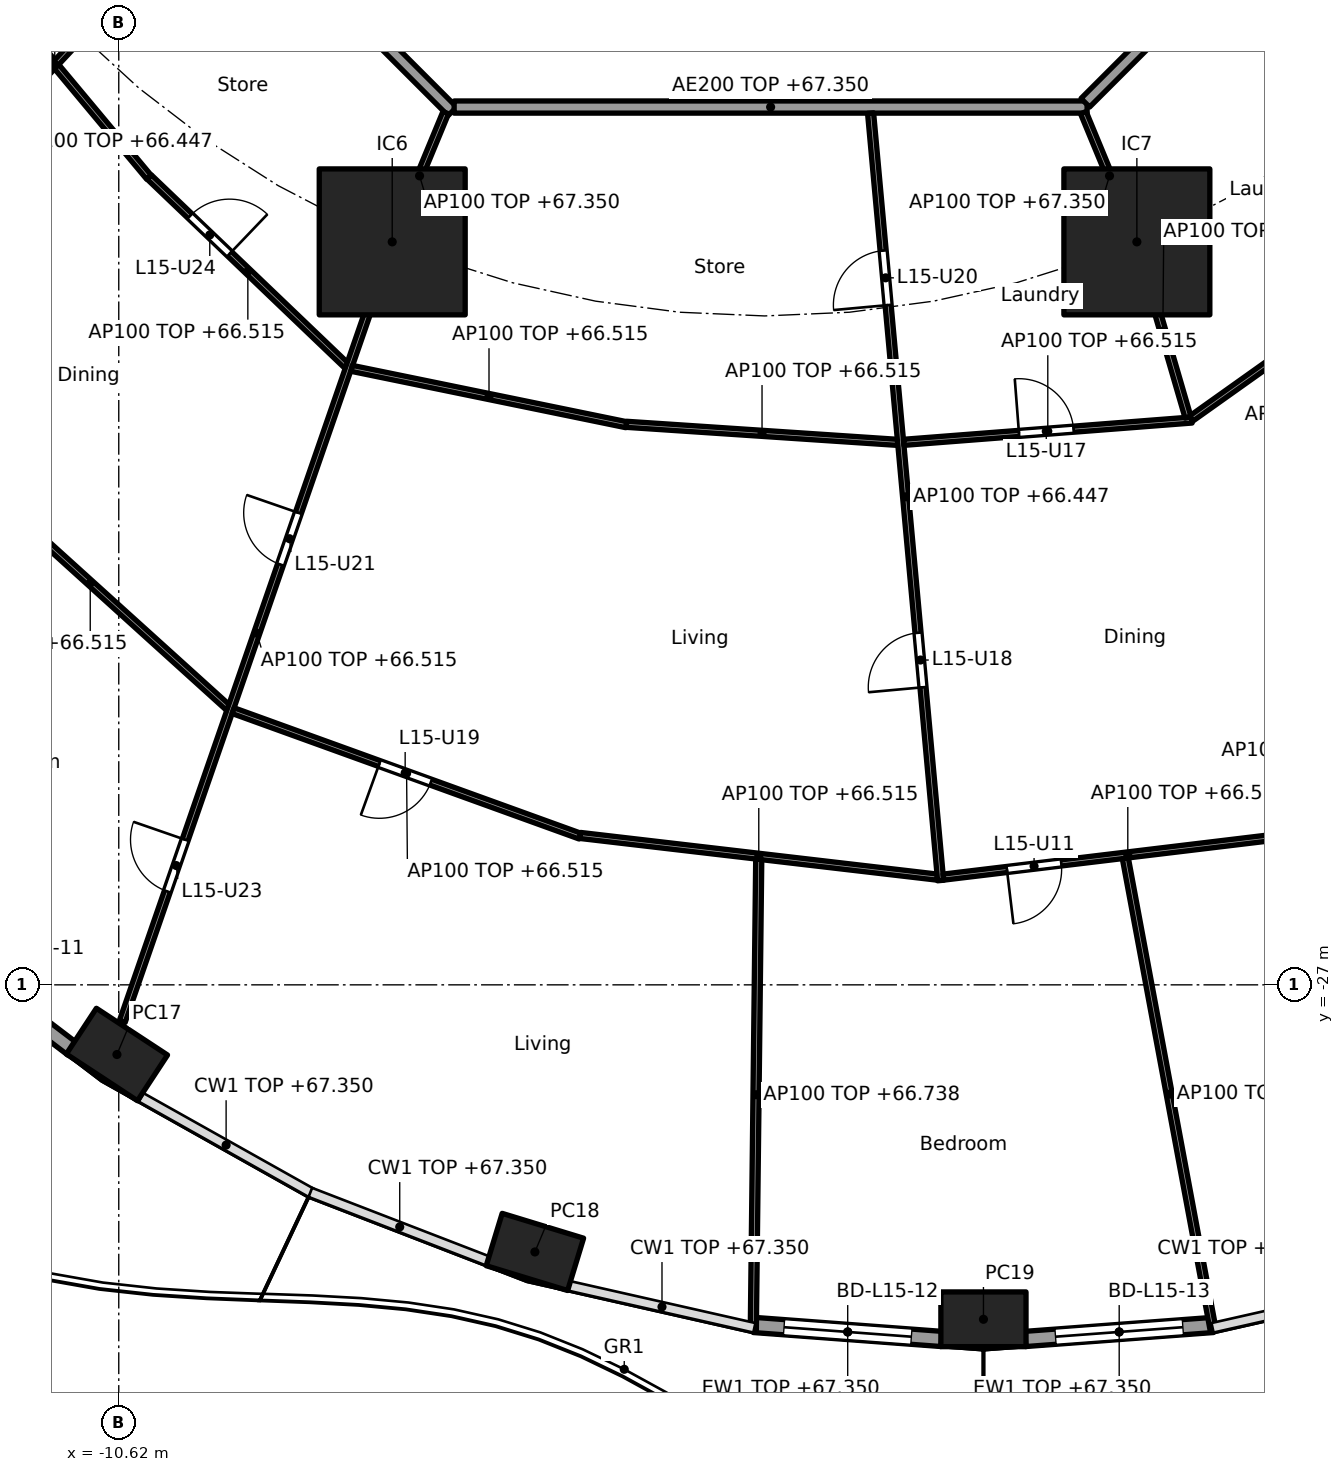
"""IFC4 building model, lengths in metres.
Left out: names, types, materials, properties, quantities, classifications, styles, units other than length and angle.
Written with IfcOpenShell. Run it as: python <this file> out.ifc"""

import sys

from ifc_helpers import new_model, si_unit, direction, frame, frame_2d, origin, origin_2d, place, context, subcontext, project, spatial, rectangle, hollow_rectangle, extrude, element, fill, save


model = new_model("IFC4")
c1 = context("Model", 3, precision=1e-05, world=origin(), true_north=direction((0.0, 1.0)))
c2 = subcontext(c1, "Body", "Model", "MODEL_VIEW")
j1 = project(units=[si_unit("LENGTHUNIT", "METRE"), si_unit("PLANEANGLEUNIT", "RADIAN")], contexts=[c1])
p1 = place(None, origin())
s1 = spatial("IfcSite", under=j1, at=p1, CompositionType="ELEMENT")
p2 = place(p1, origin())
s2 = spatial("IfcBuilding", under=s1, at=p2, CompositionType="ELEMENT")
p3 = place(p2, frame((0.0, 0.0, 64.0)))
s3 = spatial("IfcBuildingStorey", under=s2, at=p3, CompositionType="ELEMENT", Elevation=64.0)
for number, where, z_axis, x_axis in (
    (1, (-10.65, -28.146, 0.0), (0.0, 0.0, 1.0), (0.836, -0.549, 0.0)),
    (2, (-3.776, -31.393, 0.0), (0.0, 0.0, 1.0), (0.957, -0.292, 0.0)),
    (3, (3.6, -32.5, 0.0), (0.0, 0.0, 1.0), (1.0, 0.0, 0.0)),
):
    element("IfcColumn", number, at=place(p3, frame(where, z_axis=z_axis, x_axis=x_axis)), inside=s3, PredefinedType="COLUMN", context=c2, shape_type="SweptSolid", body=[
        extrude(hollow_rectangle(XDim=1.4, YDim=0.9, WallThickness=0.05, at=origin_2d()), origin(), (0.0, 0.0, 1.0), 3.7),
    ])
for number, where, z_axis, x_axis in (
    (4, (-6.123, -14.782, 0.0), (0.0, 0.0, 1.0), (1.0, 0.0, 0.0)),
    (5, (6.123, -14.782, 0.0), (0.0, 0.0, 1.0), (1.0, 0.0, 0.0)),
):
    element("IfcColumn", number, at=place(p3, frame(where, z_axis=z_axis, x_axis=x_axis)), inside=s3, PredefinedType="COLUMN", context=c2, shape_type="SweptSolid", body=[
        extrude(rectangle(XDim=2.4, YDim=2.4, at=origin_2d()), origin(), (0.0, 0.0, 1.0), 3.7),
    ])
p4 = place(p3, frame((-11.382, -28.056, 0.0), z_axis=(0.0, 0.0, 1.0), x_axis=(-0.796022293214, 0.605267303517, 0.0)))
e6 = element("IfcWall", 6, at=p4, inside=s3, PredefinedType="SOLIDWALL", context=c2, shape_type="SweptSolid", body=[
    extrude(rectangle(XDim=3.262, YDim=0.25, at=frame_2d((1.631, 0.0))), origin(), (0.0, 0.0, 1.0), 3.35),
])
p5 = place(p4, frame((0.581, 0.0, 0.0)))
e7 = element("IfcOpeningElement", 7, at=p5, cuts=e6, PredefinedType="OPENING", context=c2, shape_type="SweptSolid", body=[
    extrude(rectangle(XDim=2.1, YDim=2.4, at=frame_2d((1.05, 1.2))), frame((0.0, 0.135, 0.0), z_axis=(0.0, -1.0, 0.0), x_axis=(1.0, 0.0, 0.0)), (0.0, 0.0, 1.0), 0.27),
])
p6 = place(p3, frame((2.911, -32.823, 0.0), z_axis=(0.0, 0.0, 1.0), x_axis=(-0.997230834878, 0.074368420505, 0.0)))
e8 = element("IfcWall", 8, at=p6, inside=s3, PredefinedType="SOLIDWALL", context=c2, shape_type="SweptSolid", body=[
    extrude(rectangle(XDim=3.096, YDim=0.25, at=frame_2d((1.548, 0.0))), origin(), (0.0, 0.0, 1.0), 3.35),
])
p7 = place(p6, frame((0.498, 0.0, 0.0)))
e9 = element("IfcOpeningElement", 9, at=p7, cuts=e8, PredefinedType="OPENING", context=c2, shape_type="SweptSolid", body=[
    extrude(rectangle(XDim=2.1, YDim=2.4, at=frame_2d((1.05, 1.2))), frame((0.0, 0.135, 0.0), z_axis=(0.0, -1.0, 0.0), x_axis=(1.0, 0.0, 0.0)), (0.0, 0.0, 1.0), 0.27),
])
p8 = place(p3, frame((7.376, -32.593, 0.0), z_axis=(0.0, 0.0, 1.0), x_axis=(-0.997230834878, -0.074368420505, 0.0)))
e10 = element("IfcWall", 10, at=p8, inside=s3, PredefinedType="SOLIDWALL", context=c2, shape_type="SweptSolid", body=[
    extrude(rectangle(XDim=3.096, YDim=0.25, at=frame_2d((1.548, 0.0))), origin(), (0.0, 0.0, 1.0), 3.35),
])
p9 = place(p8, frame((0.498, 0.0, 0.0)))
e11 = element("IfcOpeningElement", 11, at=p9, cuts=e10, PredefinedType="OPENING", context=c2, shape_type="SweptSolid", body=[
    extrude(rectangle(XDim=2.1, YDim=2.4, at=frame_2d((1.05, 1.2))), frame((0.0, 0.135, 0.0), z_axis=(0.0, -1.0, 0.0), x_axis=(1.0, 0.0, 0.0)), (0.0, 0.0, 1.0), 0.27),
])
p10 = place(p3, frame((-12.635, -5.134, 0.0), z_axis=(0.0, 0.0, 1.0), x_axis=(0.707106781187, -0.707106781187, 0.0)))
e12 = element("IfcWall", 12, at=p10, inside=s3, PredefinedType="PARTITIONING", context=c2, shape_type="SweptSolid", body=[
    extrude(rectangle(XDim=10.609, YDim=0.2, at=frame_2d((5.305, 0.0))), origin(), (0.0, 0.0, 1.0), 3.35),
])
p11 = place(p3, frame((-5.104, -12.565, 0.0), z_axis=(0.0, 0.0, 1.0), x_axis=(1.0, 0.0, 0.0)))
e13 = element("IfcWall", 13, at=p11, inside=s3, PredefinedType="PARTITIONING", context=c2, shape_type="SweptSolid", body=[
    extrude(rectangle(XDim=10.409, YDim=0.2, at=frame_2d((5.205, 0.0))), origin(), (0.0, 0.0, 1.0), 3.35),
])
p12 = place(p3, frame((5.275, -12.494, 0.0), z_axis=(0.0, 0.0, 1.0), x_axis=(0.707106781187, 0.707106781187, 0.0)))
e14 = element("IfcWall", 14, at=p12, inside=s3, PredefinedType="PARTITIONING", context=c2, shape_type="SweptSolid", body=[
    extrude(rectangle(XDim=10.409, YDim=0.2, at=frame_2d((5.205, 0.0))), origin(), (0.0, 0.0, 1.0), 3.35),
])
p13 = place(p12, frame((4.604, 0.0, 0.0)))
e15 = element("IfcOpeningElement", 15, at=p13, cuts=e14, PredefinedType="OPENING", context=c2, shape_type="SweptSolid", body=[
    extrude(rectangle(XDim=1.0, YDim=2.1, at=frame_2d((0.5, 1.05))), frame((0.0, 0.11, 0.0), z_axis=(0.0, -1.0, 0.0), x_axis=(1.0, 0.0, 0.0)), (0.0, 0.0, 1.0), 0.22),
])
p14 = place(p3, frame((-13.222, -10.007, 0.0), z_axis=(0.0, 0.0, 1.0), x_axis=(0.64083455704, -0.767679015282, 0.0)))
e16 = element("IfcWall", 16, at=p14, inside=s3, PredefinedType="PARTITIONING", context=c2, shape_type="SweptSolid", body=[
    extrude(rectangle(XDim=4.837, YDim=0.1, at=frame_2d((2.418, 0.0))), origin(), (0.0, 0.0, 1.0), 2.515),
])
p15 = place(p3, frame((-8.953, -8.958, 0.0), z_axis=(0.0, 0.0, 1.0), x_axis=(-0.683322485948, -0.730116689439, 0.0)))
e17 = element("IfcWall", 17, at=p15, inside=s3, PredefinedType="PARTITIONING", context=c2, shape_type="SweptSolid", body=[
    extrude(rectangle(XDim=9.219, YDim=0.1, at=frame_2d((4.609, 0.0))), origin(), (0.0, 0.0, 1.0), 2.447),
])
p16 = place(p15, frame((6.149, 0.0, 0.0)))
e18 = element("IfcOpeningElement", 18, at=p16, cuts=e17, PredefinedType="OPENING", context=c2, shape_type="SweptSolid", body=[
    extrude(rectangle(XDim=0.9, YDim=2.1, at=frame_2d((0.45, 1.05))), frame((0.0, 0.06, 0.0), z_axis=(0.0, -1.0, 0.0), x_axis=(1.0, 0.0, 0.0)), (0.0, 0.0, 1.0), 0.12),
])
p17 = place(p3, frame((-10.119, -13.716, 0.0), z_axis=(0.0, 0.0, 1.0), x_axis=(0.722762371977, -0.691096631199, 0.0)))
e19 = element("IfcWall", 19, at=p17, inside=s3, PredefinedType="PARTITIONING", context=c2, shape_type="SweptSolid", body=[
    extrude(rectangle(XDim=4.487, YDim=0.1, at=frame_2d((2.244, 0.0))), origin(), (0.0, 0.0, 1.0), 2.515),
])
p18 = place(p17, frame((0.927, 0.0, 0.0)))
e20 = element("IfcOpeningElement", 20, at=p18, cuts=e19, PredefinedType="OPENING", context=c2, shape_type="SweptSolid", body=[
    extrude(rectangle(XDim=0.9, YDim=2.1, at=frame_2d((0.45, 1.05))), frame((0.0, 0.06, 0.0), z_axis=(0.0, -1.0, 0.0), x_axis=(1.0, 0.0, 0.0)), (0.0, 0.0, 1.0), 0.12),
])
p19 = place(p3, frame((-13.355, -18.343, 0.0), z_axis=(0.0, 0.0, 1.0), x_axis=(0.741722263338, -0.670707152242, 0.0)))
e21 = element("IfcWall", 21, at=p19, inside=s3, PredefinedType="PARTITIONING", context=c2, shape_type="SweptSolid", body=[
    extrude(rectangle(XDim=6.109, YDim=0.1, at=frame_2d((3.055, 0.0))), origin(), (0.0, 0.0, 1.0), 2.515),
])
p20 = place(p3, frame((-5.243, -12.657, 0.0), z_axis=(0.0, 0.0, 1.0), x_axis=(-0.382719158442, -0.923864733477, 0.0)))
e22 = element("IfcWall", 22, at=p20, inside=s3, PredefinedType="PARTITIONING", context=c2, shape_type="SweptSolid", body=[
    extrude(rectangle(XDim=2.25, YDim=0.1, at=frame_2d((1.125, 0.0))), origin(), (0.0, 0.0, 1.0), 3.35),
])
p21 = place(p3, frame((-6.139, -14.829, 0.0), z_axis=(0.0, 0.0, 1.0), x_axis=(-0.327178799566, -0.944962450637, 0.0)))
e23 = element("IfcWall", 23, at=p21, inside=s3, PredefinedType="PARTITIONING", context=c2, shape_type="SweptSolid", body=[
    extrude(rectangle(XDim=13.517, YDim=0.1, at=frame_2d((6.759, 0.0))), origin(), (0.0, 0.0, 1.0), 2.515),
])
p22 = place(p21, frame((4.665, 0.0, 0.0)))
e24 = element("IfcOpeningElement", 24, at=p22, cuts=e23, PredefinedType="OPENING", context=c2, shape_type="SweptSolid", body=[
    extrude(rectangle(XDim=0.9, YDim=2.1, at=frame_2d((0.45, 1.05))), frame((0.0, 0.06, 0.0), z_axis=(0.0, -1.0, 0.0), x_axis=(1.0, 0.0, 0.0)), (0.0, 0.0, 1.0), 0.12),
])
p23 = place(p21, frame((10.354, 0.0, 0.0)))
e25 = element("IfcOpeningElement", 25, at=p23, cuts=e23, PredefinedType="OPENING", context=c2, shape_type="SweptSolid", body=[
    extrude(rectangle(XDim=0.9, YDim=2.1, at=frame_2d((0.45, 1.05))), frame((0.0, 0.06, 0.0), z_axis=(0.0, -1.0, 0.0), x_axis=(1.0, 0.0, 0.0)), (0.0, 0.0, 1.0), 0.12),
])
p24 = place(p3, frame((-6.791, -16.862, 0.0), z_axis=(0.0, 0.0, 1.0), x_axis=(0.979587203416, -0.2010196779, 0.0)))
e26 = element("IfcWall", 26, at=p24, inside=s3, PredefinedType="PARTITIONING", context=c2, shape_type="SweptSolid", body=[
    extrude(rectangle(XDim=4.613, YDim=0.1, at=frame_2d((2.306, 0.0))), origin(), (0.0, 0.0, 1.0), 2.515),
])
p25 = place(p3, frame((-8.739, -22.491, 0.0), z_axis=(0.0, 0.0, 1.0), x_axis=(0.940401691072, -0.340065669288, 0.0)))
e27 = element("IfcWall", 27, at=p25, inside=s3, PredefinedType="PARTITIONING", context=c2, shape_type="SweptSolid", body=[
    extrude(rectangle(XDim=6.067, YDim=0.1, at=frame_2d((3.034, 0.0))), origin(), (0.0, 0.0, 1.0), 2.515),
])
p26 = place(p25, frame((2.559, 0.0, 0.0)))
e28 = element("IfcOpeningElement", 28, at=p26, cuts=e27, PredefinedType="OPENING", context=c2, shape_type="SweptSolid", body=[
    extrude(rectangle(XDim=0.9, YDim=2.1, at=frame_2d((0.45, 1.05))), frame((0.0, 0.06, 0.0), z_axis=(0.0, -1.0, 0.0), x_axis=(1.0, 0.0, 0.0)), (0.0, 0.0, 1.0), 0.12),
])
p27 = place(p3, frame((-2.271, -17.782, 0.0), z_axis=(0.0, 0.0, 1.0), x_axis=(0.997791437766, -0.066424744789, 0.0)))
e29 = element("IfcWall", 29, at=p27, inside=s3, PredefinedType="PARTITIONING", context=c2, shape_type="SweptSolid", body=[
    extrude(rectangle(XDim=4.469, YDim=0.1, at=frame_2d((2.235, 0.0))), origin(), (0.0, 0.0, 1.0), 2.515),
])
p28 = place(p3, frame((-3.031, -24.543, 0.0), z_axis=(0.0, 0.0, 1.0), x_axis=(0.993255612046, -0.115945198862, 0.0)))
e30 = element("IfcWall", 30, at=p28, inside=s3, PredefinedType="PARTITIONING", context=c2, shape_type="SweptSolid", body=[
    extrude(rectangle(XDim=5.913, YDim=0.1, at=frame_2d((2.956, 0.0))), origin(), (0.0, 0.0, 1.0), 2.515),
])
p29 = place(p3, frame((-0.095, -24.936, 0.0), z_axis=(0.0, 0.0, 1.0), x_axis=(-0.011541331541, -0.999933396615, 0.0)))
e31 = element("IfcWall", 31, at=p29, inside=s3, PredefinedType="PARTITIONING", context=c2, shape_type="SweptSolid", body=[
    extrude(rectangle(XDim=7.742, YDim=0.1, at=frame_2d((3.871, 0.0))), origin(), (0.0, 0.0, 1.0), 2.738),
])
p30 = place(p3, frame((1.744, -12.664, 0.0), z_axis=(0.0, 0.0, 1.0), x_axis=(0.090893569001, -0.995860612292, 0.0)))
e32 = element("IfcWall", 32, at=p30, inside=s3, PredefinedType="PARTITIONING", context=c2, shape_type="SweptSolid", body=[
    extrude(rectangle(XDim=12.673, YDim=0.1, at=frame_2d((6.336, 0.0))), origin(), (0.0, 0.0, 1.0), 2.447),
])
p31 = place(p30, frame((8.582, 0.0, 0.0)))
e33 = element("IfcOpeningElement", 33, at=p31, cuts=e32, PredefinedType="OPENING", context=c2, shape_type="SweptSolid", body=[
    extrude(rectangle(XDim=0.9, YDim=2.1, at=frame_2d((0.45, 1.05))), frame((0.0, 0.06, 0.0), z_axis=(0.0, -1.0, 0.0), x_axis=(1.0, 0.0, 0.0)), (0.0, 0.0, 1.0), 0.12),
])
p32 = place(p30, frame((2.27, 0.0, 0.0)))
e34 = element("IfcOpeningElement", 34, at=p32, cuts=e32, PredefinedType="OPENING", context=c2, shape_type="SweptSolid", body=[
    extrude(rectangle(XDim=0.9, YDim=2.1, at=frame_2d((0.45, 1.05))), frame((0.0, 0.06, 0.0), z_axis=(0.0, -1.0, 0.0), x_axis=(1.0, 0.0, 0.0)), (0.0, 0.0, 1.0), 0.12),
])
p33 = place(p3, frame((2.288, -18.078, 0.0), z_axis=(0.0, 0.0, 1.0), x_axis=(0.997016297228, 0.077191340583, 0.0)))
e35 = element("IfcWall", 35, at=p33, inside=s3, PredefinedType="PARTITIONING", context=c2, shape_type="SweptSolid", body=[
    extrude(rectangle(XDim=4.754, YDim=0.1, at=frame_2d((2.377, 0.0))), origin(), (0.0, 0.0, 1.0), 2.515),
])
p34 = place(p33, frame((1.902, 0.0, 0.0)))
e36 = element("IfcOpeningElement", 36, at=p34, cuts=e35, PredefinedType="OPENING", context=c2, shape_type="SweptSolid", body=[
    extrude(rectangle(XDim=0.9, YDim=2.1, at=frame_2d((0.45, 1.05))), frame((0.0, 0.06, 0.0), z_axis=(0.0, -1.0, 0.0), x_axis=(1.0, 0.0, 0.0)), (0.0, 0.0, 1.0), 0.12),
])
p35 = place(p3, frame((2.941, -25.229, 0.0), z_axis=(0.0, 0.0, 1.0), x_axis=(0.992836126149, 0.119484001497, 0.0)))
e37 = element("IfcWall", 37, at=p35, inside=s3, PredefinedType="PARTITIONING", context=c2, shape_type="SweptSolid", body=[
    extrude(rectangle(XDim=6.109, YDim=0.1, at=frame_2d((3.055, 0.0))), origin(), (0.0, 0.0, 1.0), 2.515),
])
p36 = place(p35, frame((1.052, 0.0, 0.0)))
e38 = element("IfcOpeningElement", 38, at=p36, cuts=e37, PredefinedType="OPENING", context=c2, shape_type="SweptSolid", body=[
    extrude(rectangle(XDim=0.9, YDim=2.1, at=frame_2d((0.45, 1.05))), frame((0.0, 0.06, 0.0), z_axis=(0.0, -1.0, 0.0), x_axis=(1.0, 0.0, 0.0)), (0.0, 0.0, 1.0), 0.12),
])
p37 = place(p3, frame((5.933, -24.919, 0.0), z_axis=(0.0, 0.0, 1.0), x_axis=(0.183018461258, -0.983109476528, 0.0)))
e39 = element("IfcWall", 39, at=p37, inside=s3, PredefinedType="PARTITIONING", context=c2, shape_type="SweptSolid", body=[
    extrude(rectangle(XDim=7.893, YDim=0.1, at=frame_2d((3.947, 0.0))), origin(), (0.0, 0.0, 1.0), 2.738),
])
p38 = place(p3, frame((5.243, -12.657, 0.0), z_axis=(0.0, 0.0, 1.0), x_axis=(0.382719158442, -0.923864733477, 0.0)))
e40 = element("IfcWall", 40, at=p38, inside=s3, PredefinedType="PARTITIONING", context=c2, shape_type="SweptSolid", body=[
    extrude(rectangle(XDim=2.25, YDim=0.1, at=frame_2d((1.125, 0.0))), origin(), (0.0, 0.0, 1.0), 3.35),
])
p39 = place(p3, frame((6.137, -14.83, 0.0), z_axis=(0.0, 0.0, 1.0), x_axis=(0.279888967793, -0.960032377427, 0.0)))
e41 = element("IfcWall", 41, at=p39, inside=s3, PredefinedType="PARTITIONING", context=c2, shape_type="SweptSolid", body=[
    extrude(rectangle(XDim=2.955, YDim=0.1, at=frame_2d((1.478, 0.0))), origin(), (0.0, 0.0, 1.0), 3.35),
])
p40 = place(p3, frame((7.019, -17.686, 0.0), z_axis=(0.0, 0.0, 1.0), x_axis=(0.81494477814, 0.57953861699, 0.0)))
e42 = element("IfcWall", 42, at=p40, inside=s3, PredefinedType="PARTITIONING", context=c2, shape_type="SweptSolid", body=[
    extrude(rectangle(XDim=3.644, YDim=0.1, at=frame_2d((1.822, 0.0))), origin(), (0.0, 0.0, 1.0), 2.515),
])
p41 = place(p40, frame((2.564, 0.0, 0.0)))
e43 = element("IfcOpeningElement", 43, at=p41, cuts=e42, PredefinedType="OPENING", context=c2, shape_type="SweptSolid", body=[
    extrude(rectangle(XDim=0.9, YDim=2.1, at=frame_2d((0.45, 1.05))), frame((0.0, 0.06, 0.0), z_axis=(0.0, -1.0, 0.0), x_axis=(1.0, 0.0, 0.0)), (0.0, 0.0, 1.0), 0.12),
])
p42 = place(p3, frame((8.028, -9.882, 0.0), z_axis=(0.0, 0.0, 1.0), x_axis=(0.631035554955, -0.77575390968, 0.0)))
e44 = element("IfcWall", 44, at=p42, inside=s3, PredefinedType="PARTITIONING", context=c2, shape_type="SweptSolid", body=[
    extrude(rectangle(XDim=12.759, YDim=0.1, at=frame_2d((6.379, 0.0))), origin(), (0.0, 0.0, 1.0), 2.447),
])
p43 = place(p42, frame((2.311, 0.0, 0.0)))
e45 = element("IfcOpeningElement", 45, at=p43, cuts=e44, PredefinedType="OPENING", context=c2, shape_type="SweptSolid", body=[
    extrude(rectangle(XDim=0.9, YDim=2.1, at=frame_2d((0.45, 1.05))), frame((0.0, 0.06, 0.0), z_axis=(0.0, -1.0, 0.0), x_axis=(1.0, 0.0, 0.0)), (0.0, 0.0, 1.0), 0.12),
])
p44 = place(p42, frame((8.69, 0.0, 0.0)))
e46 = element("IfcOpeningElement", 46, at=p44, cuts=e44, PredefinedType="OPENING", context=c2, shape_type="SweptSolid", body=[
    extrude(rectangle(XDim=0.9, YDim=2.1, at=frame_2d((0.45, 1.05))), frame((0.0, 0.06, 0.0), z_axis=(0.0, -1.0, 0.0), x_axis=(1.0, 0.0, 0.0)), (0.0, 0.0, 1.0), 0.12),
])
p45 = place(p7, origin())
e47 = element("IfcDoor", 47, at=p45, inside=s3, OperationType="SLIDING_TO_LEFT", PredefinedType="DOOR", context=c2, shape_type="SweptSolid", body=[
    extrude(rectangle(XDim=2.1, YDim=2.4, at=frame_2d((1.05, 1.2))), frame((0.0, 0.025, 0.0), z_axis=(0.0, -1.0, 0.0), x_axis=(1.0, 0.0, 0.0)), (0.0, 0.0, 1.0), 0.05),
])
fill(e9, e47)
p46 = place(p9, origin())
e48 = element("IfcDoor", 48, at=p46, inside=s3, OperationType="SLIDING_TO_LEFT", PredefinedType="DOOR", context=c2, shape_type="SweptSolid", body=[
    extrude(rectangle(XDim=2.1, YDim=2.4, at=frame_2d((1.05, 1.2))), frame((0.0, 0.025, 0.0), z_axis=(0.0, -1.0, 0.0), x_axis=(1.0, 0.0, 0.0)), (0.0, 0.0, 1.0), 0.05),
])
fill(e11, e48)
p47 = place(p36, frame((0.9, 0.0, 0.0), x_axis=(-1.0, 0.0, 0.0)))
e49 = element("IfcDoor", 49, at=p47, inside=s3, OperationType="SINGLE_SWING_RIGHT", PredefinedType="DOOR", context=c2, shape_type="SweptSolid", body=[
    extrude(rectangle(XDim=0.9, YDim=2.1, at=frame_2d((0.45, 1.05))), frame((0.0, 0.025, 0.0), z_axis=(0.0, -1.0, 0.0), x_axis=(1.0, 0.0, 0.0)), (0.0, 0.0, 1.0), 0.05),
])
fill(e38, e49)
p48 = place(p34, origin())
e50 = element("IfcDoor", 50, at=p48, inside=s3, OperationType="SINGLE_SWING_LEFT", PredefinedType="DOOR", context=c2, shape_type="SweptSolid", body=[
    extrude(rectangle(XDim=0.9, YDim=2.1, at=frame_2d((0.45, 1.05))), frame((0.0, 0.025, 0.0), z_axis=(0.0, -1.0, 0.0), x_axis=(1.0, 0.0, 0.0)), (0.0, 0.0, 1.0), 0.05),
])
fill(e36, e50)
p49 = place(p31, frame((0.9, 0.0, 0.0), x_axis=(-1.0, 0.0, 0.0)))
e51 = element("IfcDoor", 51, at=p49, inside=s3, OperationType="SINGLE_SWING_LEFT", PredefinedType="DOOR", context=c2, shape_type="SweptSolid", body=[
    extrude(rectangle(XDim=0.9, YDim=2.1, at=frame_2d((0.45, 1.05))), frame((0.0, 0.025, 0.0), z_axis=(0.0, -1.0, 0.0), x_axis=(1.0, 0.0, 0.0)), (0.0, 0.0, 1.0), 0.05),
])
fill(e33, e51)
p50 = place(p26, frame((0.9, 0.0, 0.0), x_axis=(-1.0, 0.0, 0.0)))
e52 = element("IfcDoor", 52, at=p50, inside=s3, OperationType="SINGLE_SWING_RIGHT", PredefinedType="DOOR", context=c2, shape_type="SweptSolid", body=[
    extrude(rectangle(XDim=0.9, YDim=2.1, at=frame_2d((0.45, 1.05))), frame((0.0, 0.025, 0.0), z_axis=(0.0, -1.0, 0.0), x_axis=(1.0, 0.0, 0.0)), (0.0, 0.0, 1.0), 0.05),
])
fill(e28, e52)
p51 = place(p32, frame((0.9, 0.0, 0.0), x_axis=(-1.0, 0.0, 0.0)))
e53 = element("IfcDoor", 53, at=p51, inside=s3, OperationType="SINGLE_SWING_LEFT", PredefinedType="DOOR", context=c2, shape_type="SweptSolid", body=[
    extrude(rectangle(XDim=0.9, YDim=2.1, at=frame_2d((0.45, 1.05))), frame((0.0, 0.025, 0.0), z_axis=(0.0, -1.0, 0.0), x_axis=(1.0, 0.0, 0.0)), (0.0, 0.0, 1.0), 0.05),
])
fill(e34, e53)
p52 = place(p22, frame((0.9, 0.0, 0.0), x_axis=(-1.0, 0.0, 0.0)))
e54 = element("IfcDoor", 54, at=p52, inside=s3, OperationType="SINGLE_SWING_RIGHT", PredefinedType="DOOR", context=c2, shape_type="SweptSolid", body=[
    extrude(rectangle(XDim=0.9, YDim=2.1, at=frame_2d((0.45, 1.05))), frame((0.0, 0.025, 0.0), z_axis=(0.0, -1.0, 0.0), x_axis=(1.0, 0.0, 0.0)), (0.0, 0.0, 1.0), 0.05),
])
fill(e24, e54)
p53 = place(p23, frame((0.9, 0.0, 0.0), x_axis=(-1.0, 0.0, 0.0)))
e55 = element("IfcDoor", 55, at=p53, inside=s3, OperationType="SINGLE_SWING_RIGHT", PredefinedType="DOOR", context=c2, shape_type="SweptSolid", body=[
    extrude(rectangle(XDim=0.9, YDim=2.1, at=frame_2d((0.45, 1.05))), frame((0.0, 0.025, 0.0), z_axis=(0.0, -1.0, 0.0), x_axis=(1.0, 0.0, 0.0)), (0.0, 0.0, 1.0), 0.05),
])
fill(e25, e55)
p54 = place(p18, origin())
e56 = element("IfcDoor", 56, at=p54, inside=s3, OperationType="SINGLE_SWING_RIGHT", PredefinedType="DOOR", context=c2, shape_type="SweptSolid", body=[
    extrude(rectangle(XDim=0.9, YDim=2.1, at=frame_2d((0.45, 1.05))), frame((0.0, 0.025, 0.0), z_axis=(0.0, -1.0, 0.0), x_axis=(1.0, 0.0, 0.0)), (0.0, 0.0, 1.0), 0.05),
])
fill(e20, e56)
save(model, sys.argv[1])
